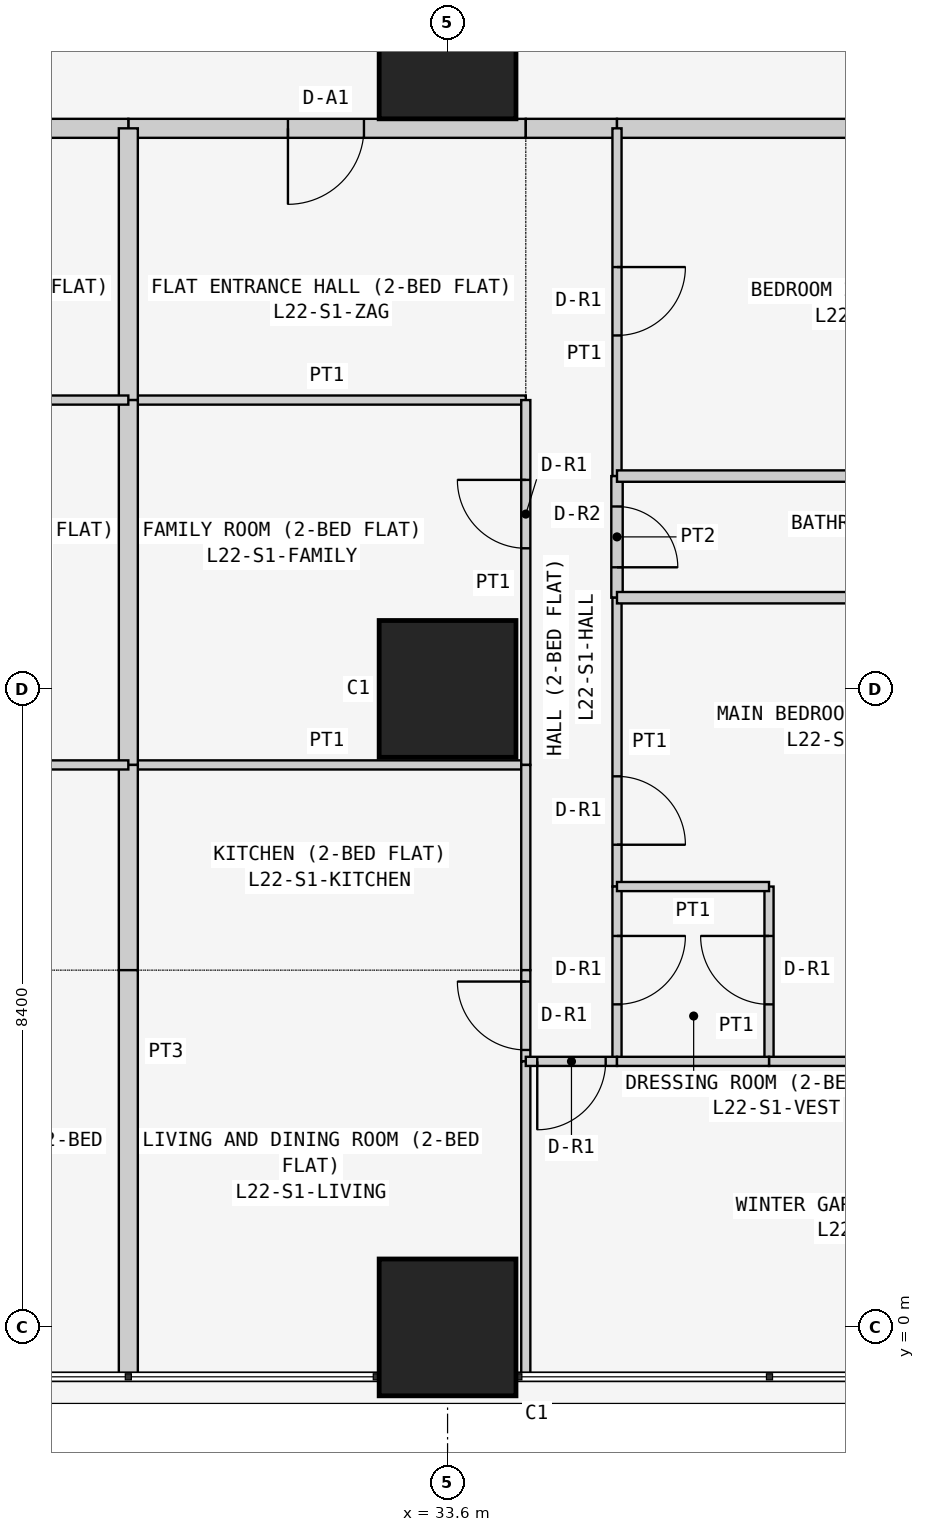
"""IFC4 building model, lengths in metres.
Left out: names, types, materials, properties, quantities, classifications, styles, units other than length and angle.
Written with IfcOpenShell. Run it as: python <this file> out.ifc"""

import sys

from ifc_helpers import new_model, si_unit, direction, frame, frame_2d, origin, origin_2d, place, context, subcontext, project, spatial, rectangle, extrude, element, fill, save


model = new_model("IFC4")
c1 = context("Model", 3, precision=1e-05, world=origin(), true_north=direction((0.0, 1.0)))
c2 = subcontext(c1, "Body", "Model", "MODEL_VIEW")
j1 = project(units=[si_unit("LENGTHUNIT", "METRE"), si_unit("PLANEANGLEUNIT", "RADIAN")], contexts=[c1])
p1 = place(None, origin())
s1 = spatial("IfcSite", under=j1, at=p1, CompositionType="ELEMENT")
p2 = place(p1, origin())
s2 = spatial("IfcBuilding", under=s1, at=p2, CompositionType="ELEMENT")
p3 = place(p2, frame((0.0, 0.0, 88.5)))
s3 = spatial("IfcBuildingStorey", under=s2, at=p3, CompositionType="ELEMENT", Elevation=88.5)
for number, where, z_axis, x_axis in (
    (1, (33.6, 0.0, 0.0), (0.0, 0.0, 1.0), (1.0, 0.0, 0.0)),
    (2, (33.6, 8.4, 0.0), (0.0, 0.0, 1.0), (1.0, 0.0, 0.0)),
    (3, (33.6, 16.8, 0.0), (0.0, 0.0, 1.0), (1.0, 0.0, 0.0)),
):
    element("IfcColumn", number, at=place(p3, frame(where, z_axis=z_axis, x_axis=x_axis)), inside=s3, PredefinedType="COLUMN", context=c2, shape_type="SweptSolid", body=[
        extrude(rectangle(XDim=1.8, YDim=1.8, at=origin_2d()), origin(), (0.0, 0.0, 1.0), 3.6),
    ])
p4 = place(p3, frame((34.629, 15.775, 0.0), z_axis=(0.0, 0.0, 1.0), x_axis=(-1.0, 0.0, 0.0)))
e4 = element("IfcWall", 4, at=p4, inside=s3, PredefinedType="PARTITIONING", context=c2, shape_type="SweptSolid", body=[
    extrude(rectangle(XDim=5.229, YDim=0.25, at=frame_2d((2.615, 0.0))), origin(), (0.0, 0.0, 1.0), 3.45),
])
p5 = place(p4, frame((2.129, 0.0, 0.0)))
e5 = element("IfcOpeningElement", 5, at=p5, cuts=e4, PredefinedType="OPENING", context=c2, shape_type="SweptSolid", body=[
    extrude(rectangle(XDim=1.0, YDim=2.1, at=frame_2d((0.5, 1.05))), frame((0.0, 0.135, 0.0), z_axis=(0.0, -1.0, 0.0), x_axis=(1.0, 0.0, 0.0)), (0.0, 0.0, 1.0), 0.27),
])
p6 = place(p3, frame((35.829, 15.775, 0.0), z_axis=(0.0, 0.0, 1.0), x_axis=(-1.0, 0.0, 0.0)))
e6 = element("IfcWall", 6, at=p6, inside=s3, PredefinedType="PARTITIONING", context=c2, shape_type="SweptSolid", body=[
    extrude(rectangle(XDim=1.2, YDim=0.25, at=frame_2d((0.6, 0.0))), origin(), (0.0, 0.0, 1.0), 3.45),
])
p7 = place(p3, frame((42.7, 15.775, 0.0), z_axis=(0.0, 0.0, 1.0), x_axis=(-1.0, 0.0, 0.0)))
e7 = element("IfcWall", 7, at=p7, inside=s3, PredefinedType="PARTITIONING", context=c2, shape_type="SweptSolid", body=[
    extrude(rectangle(XDim=6.871, YDim=0.25, at=frame_2d((3.436, 0.0))), origin(), (0.0, 0.0, 1.0), 3.45),
])
p8 = place(p3, frame((29.4, 15.775, 0.0), z_axis=(0.0, 0.0, 1.0), x_axis=(-1.0, 0.0, 0.0)))
e8 = element("IfcWall", 8, at=p8, inside=s3, PredefinedType="PARTITIONING", context=c2, shape_type="SweptSolid", body=[
    extrude(rectangle(XDim=5.229, YDim=0.25, at=frame_2d((2.615, 0.0))), origin(), (0.0, 0.0, 1.0), 3.45),
])
p9 = place(p8, frame((2.1, 0.0, 0.0)))
e9 = element("IfcOpeningElement", 9, at=p9, cuts=e8, PredefinedType="OPENING", context=c2, shape_type="SweptSolid", body=[
    extrude(rectangle(XDim=1.0, YDim=2.1, at=frame_2d((0.5, 1.05))), frame((0.0, 0.135, 0.0), z_axis=(0.0, -1.0, 0.0), x_axis=(1.0, 0.0, 0.0)), (0.0, 0.0, 1.0), 0.27),
])
p10 = place(p3, frame((29.4, 12.2, 0.0), z_axis=(0.0, 0.0, 1.0), x_axis=(1.0, 0.0, 0.0)))
e10 = element("IfcWall", 10, at=p10, inside=s3, PredefinedType="PARTITIONING", context=c2, shape_type="SweptSolid", body=[
    extrude(rectangle(XDim=5.229, YDim=0.12, at=frame_2d((2.615, 0.0))), origin(), (0.0, 0.0, 1.0), 3.45),
])
p11 = place(p3, frame((29.4, 15.775, 0.0), z_axis=(0.0, 0.0, 1.0), x_axis=(0.0, -1.0, 0.0)))
e11 = element("IfcWall", 11, at=p11, inside=s3, PredefinedType="PARTITIONING", context=c2, shape_type="SweptSolid", body=[
    extrude(rectangle(XDim=3.575, YDim=0.25, at=frame_2d((1.788, 0.0))), origin(), (0.0, 0.0, 1.0), 2.848),
])
p12 = place(p3, frame((29.4, 7.4, 0.0), z_axis=(0.0, 0.0, 1.0), x_axis=(1.0, 0.0, 0.0)))
e12 = element("IfcWall", 12, at=p12, inside=s3, PredefinedType="PARTITIONING", context=c2, shape_type="SweptSolid", body=[
    extrude(rectangle(XDim=5.229, YDim=0.12, at=frame_2d((2.615, 0.0))), origin(), (0.0, 0.0, 1.0), 3.45),
])
p13 = place(p3, frame((34.629, 7.4, 0.0), z_axis=(0.0, 0.0, 1.0), x_axis=(0.0, 1.0, 0.0)))
e13 = element("IfcWall", 13, at=p13, inside=s3, PredefinedType="PARTITIONING", context=c2, shape_type="SweptSolid", body=[
    extrude(rectangle(XDim=4.8, YDim=0.12, at=frame_2d((2.4, 0.0))), origin(), (0.0, 0.0, 1.0), 3.45),
])
p14 = place(p13, frame((2.85, 0.0, 0.0)))
e14 = element("IfcOpeningElement", 14, at=p14, cuts=e13, PredefinedType="OPENING", context=c2, shape_type="SweptSolid", body=[
    extrude(rectangle(XDim=0.9, YDim=2.1, at=frame_2d((0.45, 1.05))), frame((0.0, 0.07, 0.0), z_axis=(0.0, -1.0, 0.0), x_axis=(1.0, 0.0, 0.0)), (0.0, 0.0, 1.0), 0.14),
])
p15 = place(p3, frame((29.4, 12.2, 0.0), z_axis=(0.0, 0.0, 1.0), x_axis=(0.0, -1.0, 0.0)))
e15 = element("IfcWall", 15, at=p15, inside=s3, PredefinedType="PARTITIONING", context=c2, shape_type="SweptSolid", body=[
    extrude(rectangle(XDim=4.8, YDim=0.25, at=frame_2d((2.4, 0.0))), origin(), (0.0, 0.0, 1.0), 2.848),
])
p16 = place(p3, frame((34.629, 4.7, 0.0), z_axis=(0.0, 0.0, 1.0), x_axis=(0.0, 1.0, 0.0)))
e16 = element("IfcWall", 16, at=p16, inside=s3, PredefinedType="PARTITIONING", context=c2, shape_type="SweptSolid", body=[
    extrude(rectangle(XDim=2.7, YDim=0.12, at=frame_2d((1.35, 0.0))), origin(), (0.0, 0.0, 1.0), 3.45),
])
p17 = place(p3, frame((29.4, 7.4, 0.0), z_axis=(0.0, 0.0, 1.0), x_axis=(0.0, -1.0, 0.0)))
e17 = element("IfcWall", 17, at=p17, inside=s3, PredefinedType="PARTITIONING", context=c2, shape_type="SweptSolid", body=[
    extrude(rectangle(XDim=2.7, YDim=0.25, at=frame_2d((1.35, 0.0))), origin(), (0.0, 0.0, 1.0), 2.848),
])
p18 = place(p3, frame((34.629, 3.5, 0.0), z_axis=(0.0, 0.0, 1.0), x_axis=(0.0, 1.0, 0.0)))
e18 = element("IfcWall", 18, at=p18, inside=s3, PredefinedType="PARTITIONING", context=c2, shape_type="SweptSolid", body=[
    extrude(rectangle(XDim=1.2, YDim=0.12, at=frame_2d((0.6, 0.0))), origin(), (0.0, 0.0, 1.0), 3.45),
])
p19 = place(p18, frame((0.15, 0.0, 0.0)))
e19 = element("IfcOpeningElement", 19, at=p19, cuts=e18, PredefinedType="OPENING", context=c2, shape_type="SweptSolid", body=[
    extrude(rectangle(XDim=0.9, YDim=2.1, at=frame_2d((0.45, 1.05))), frame((0.0, 0.07, 0.0), z_axis=(0.0, -1.0, 0.0), x_axis=(1.0, 0.0, 0.0)), (0.0, 0.0, 1.0), 0.14),
])
p20 = place(p3, frame((34.629, -0.65, 0.0), z_axis=(0.0, 0.0, 1.0), x_axis=(0.0, 1.0, 0.0)))
e20 = element("IfcWall", 20, at=p20, inside=s3, PredefinedType="PARTITIONING", context=c2, shape_type="SweptSolid", body=[
    extrude(rectangle(XDim=4.15, YDim=0.12, at=frame_2d((2.075, 0.0))), origin(), (0.0, 0.0, 1.0), 3.45),
])
p21 = place(p3, frame((29.4, 4.7, 0.0), z_axis=(0.0, 0.0, 1.0), x_axis=(0.0, -1.0, 0.0)))
e21 = element("IfcWall", 21, at=p21, inside=s3, PredefinedType="PARTITIONING", context=c2, shape_type="SweptSolid", body=[
    extrude(rectangle(XDim=5.35, YDim=0.25, at=frame_2d((2.675, 0.0))), origin(), (0.0, 0.0, 1.0), 2.848),
])
p22 = place(p3, frame((35.829, 11.2, 0.0), z_axis=(0.0, 0.0, 1.0), x_axis=(0.0, 1.0, 0.0)))
e22 = element("IfcWall", 22, at=p22, inside=s3, PredefinedType="PARTITIONING", context=c2, shape_type="SweptSolid", body=[
    extrude(rectangle(XDim=4.575, YDim=0.12, at=frame_2d((2.288, 0.0))), origin(), (0.0, 0.0, 1.0), 3.45),
])
p23 = place(p22, frame((1.85, 0.0, 0.0)))
e23 = element("IfcOpeningElement", 23, at=p23, cuts=e22, PredefinedType="OPENING", context=c2, shape_type="SweptSolid", body=[
    extrude(rectangle(XDim=0.9, YDim=2.1, at=frame_2d((0.45, 1.05))), frame((0.0, 0.07, 0.0), z_axis=(0.0, -1.0, 0.0), x_axis=(1.0, 0.0, 0.0)), (0.0, 0.0, 1.0), 0.14),
])
p24 = place(p3, frame((35.829, 9.6, 0.0), z_axis=(0.0, 0.0, 1.0), x_axis=(0.0, 1.0, 0.0)))
e24 = element("IfcWall", 24, at=p24, inside=s3, PredefinedType="PARTITIONING", context=c2, shape_type="SweptSolid", body=[
    extrude(rectangle(XDim=1.6, YDim=0.15, at=frame_2d((0.8, 0.0))), origin(), (0.0, 0.0, 1.0), 3.45),
])
p25 = place(p24, frame((0.4, 0.0, 0.0)))
e25 = element("IfcOpeningElement", 25, at=p25, cuts=e24, PredefinedType="OPENING", context=c2, shape_type="SweptSolid", body=[
    extrude(rectangle(XDim=0.8, YDim=2.1, at=frame_2d((0.4, 1.05))), frame((0.0, 0.085, 0.0), z_axis=(0.0, -1.0, 0.0), x_axis=(1.0, 0.0, 0.0)), (0.0, 0.0, 1.0), 0.17),
])
p26 = place(p3, frame((35.829, 5.8, 0.0), z_axis=(0.0, 0.0, 1.0), x_axis=(0.0, 1.0, 0.0)))
e26 = element("IfcWall", 26, at=p26, inside=s3, PredefinedType="PARTITIONING", context=c2, shape_type="SweptSolid", body=[
    extrude(rectangle(XDim=3.8, YDim=0.12, at=frame_2d((1.9, 0.0))), origin(), (0.0, 0.0, 1.0), 3.45),
])
p27 = place(p26, frame((0.55, 0.0, 0.0)))
e27 = element("IfcOpeningElement", 27, at=p27, cuts=e26, PredefinedType="OPENING", context=c2, shape_type="SweptSolid", body=[
    extrude(rectangle(XDim=0.9, YDim=2.1, at=frame_2d((0.45, 1.05))), frame((0.0, 0.07, 0.0), z_axis=(0.0, -1.0, 0.0), x_axis=(1.0, 0.0, 0.0)), (0.0, 0.0, 1.0), 0.14),
])
p28 = place(p3, frame((35.829, 3.5, 0.0), z_axis=(0.0, 0.0, 1.0), x_axis=(0.0, 1.0, 0.0)))
e28 = element("IfcWall", 28, at=p28, inside=s3, PredefinedType="PARTITIONING", context=c2, shape_type="SweptSolid", body=[
    extrude(rectangle(XDim=2.3, YDim=0.12, at=frame_2d((1.15, 0.0))), origin(), (0.0, 0.0, 1.0), 3.45),
])
p29 = place(p28, frame((0.75, 0.0, 0.0)))
e29 = element("IfcOpeningElement", 29, at=p29, cuts=e28, PredefinedType="OPENING", context=c2, shape_type="SweptSolid", body=[
    extrude(rectangle(XDim=0.9, YDim=2.1, at=frame_2d((0.45, 1.05))), frame((0.0, 0.07, 0.0), z_axis=(0.0, -1.0, 0.0), x_axis=(1.0, 0.0, 0.0)), (0.0, 0.0, 1.0), 0.14),
])
p30 = place(p3, frame((34.629, 3.5, 0.0), z_axis=(0.0, 0.0, 1.0), x_axis=(1.0, 0.0, 0.0)))
e30 = element("IfcWall", 30, at=p30, inside=s3, PredefinedType="PARTITIONING", context=c2, shape_type="SweptSolid", body=[
    extrude(rectangle(XDim=1.2, YDim=0.12, at=frame_2d((0.6, 0.0))), origin(), (0.0, 0.0, 1.0), 3.45),
])
p31 = place(p30, frame((0.151, 0.0, 0.0)))
e31 = element("IfcOpeningElement", 31, at=p31, cuts=e30, PredefinedType="OPENING", context=c2, shape_type="SweptSolid", body=[
    extrude(rectangle(XDim=0.9, YDim=2.1, at=frame_2d((0.45, 1.05))), frame((0.0, 0.07, 0.0), z_axis=(0.0, -1.0, 0.0), x_axis=(1.0, 0.0, 0.0)), (0.0, 0.0, 1.0), 0.14),
])
for number, where, z_axis, x_axis in (
    (32, (35.829, 11.2, 0.0), (0.0, 0.0, 1.0), (1.0, 0.0, 0.0)),
    (33, (35.829, 9.6, 0.0), (0.0, 0.0, 1.0), (1.0, 0.0, 0.0)),
):
    element("IfcWall", number, at=place(p3, frame(where, z_axis=z_axis, x_axis=x_axis)), inside=s3, PredefinedType="PARTITIONING", context=c2, shape_type="SweptSolid", body=[
        extrude(rectangle(XDim=6.871, YDim=0.15, at=frame_2d((3.436, 0.0))), origin(), (0.0, 0.0, 1.0), 3.45),
    ])
p32 = place(p3, frame((37.829, 3.5, 0.0), z_axis=(0.0, 0.0, 1.0), x_axis=(0.0, 1.0, 0.0)))
e34 = element("IfcWall", 34, at=p32, inside=s3, PredefinedType="PARTITIONING", context=c2, shape_type="SweptSolid", body=[
    extrude(rectangle(XDim=2.3, YDim=0.12, at=frame_2d((1.15, 0.0))), origin(), (0.0, 0.0, 1.0), 2.848),
])
p33 = place(p32, frame((0.75, 0.0, 0.0)))
e35 = element("IfcOpeningElement", 35, at=p33, cuts=e34, PredefinedType="OPENING", context=c2, shape_type="SweptSolid", body=[
    extrude(rectangle(XDim=0.9, YDim=2.1, at=frame_2d((0.45, 1.05))), frame((0.0, 0.07, 0.0), z_axis=(0.0, -1.0, 0.0), x_axis=(1.0, 0.0, 0.0)), (0.0, 0.0, 1.0), 0.14),
])
p34 = place(p3, frame((37.829, 5.8, 0.0), z_axis=(0.0, 0.0, 1.0), x_axis=(-1.0, 0.0, 0.0)))
e36 = element("IfcWall", 36, at=p34, inside=s3, PredefinedType="PARTITIONING", context=c2, shape_type="SweptSolid", body=[
    extrude(rectangle(XDim=2.0, YDim=0.12, at=frame_2d((1.0, 0.0))), origin(), (0.0, 0.0, 1.0), 3.45),
])
p35 = place(p3, frame((42.7, 3.5, 0.0), z_axis=(0.0, 0.0, 1.0), x_axis=(-1.0, 0.0, 0.0)))
e37 = element("IfcWall", 37, at=p35, inside=s3, PredefinedType="PARTITIONING", context=c2, shape_type="SweptSolid", body=[
    extrude(rectangle(XDim=4.871, YDim=0.12, at=frame_2d((2.436, 0.0))), origin(), (0.0, 0.0, 1.0), 3.45),
])
p36 = place(p3, frame((35.829, 3.5, 0.0), z_axis=(0.0, 0.0, 1.0), x_axis=(1.0, 0.0, 0.0)))
e38 = element("IfcWall", 38, at=p36, inside=s3, PredefinedType="PARTITIONING", context=c2, shape_type="SweptSolid", body=[
    extrude(rectangle(XDim=2.0, YDim=0.12, at=frame_2d((1.0, 0.0))), origin(), (0.0, 0.0, 1.0), 3.45),
])
for number, where, z_axis, x_axis in (
    (39, (29.4, 12.2, 0.0), (0.0, 0.0, 1.0), (-1.0, 0.0, 0.0)),
    (40, (29.4, 7.4, 0.0), (0.0, 0.0, 1.0), (-1.0, 0.0, 0.0)),
):
    element("IfcWall", number, at=place(p3, frame(where, z_axis=z_axis, x_axis=x_axis)), inside=s3, PredefinedType="PARTITIONING", context=c2, shape_type="SweptSolid", body=[
        extrude(rectangle(XDim=5.229, YDim=0.12, at=frame_2d((2.615, 0.0))), origin(), (0.0, 0.0, 1.0), 3.45),
    ])
p37 = place(p5, origin())
e41 = element("IfcDoor", 41, at=p37, inside=s3, OperationType="SINGLE_SWING_RIGHT", PredefinedType="DOOR", context=c2, shape_type="SweptSolid", body=[
    extrude(rectangle(XDim=1.0, YDim=2.1, at=frame_2d((0.5, 1.05))), frame((0.0, 0.025, 0.0), z_axis=(0.0, -1.0, 0.0), x_axis=(1.0, 0.0, 0.0)), (0.0, 0.0, 1.0), 0.05),
])
fill(e5, e41)
p38 = place(p14, origin())
e42 = element("IfcDoor", 42, at=p38, inside=s3, OperationType="SINGLE_SWING_RIGHT", PredefinedType="DOOR", context=c2, shape_type="SweptSolid", body=[
    extrude(rectangle(XDim=0.9, YDim=2.1, at=frame_2d((0.45, 1.05))), frame((0.0, 0.025, 0.0), z_axis=(0.0, -1.0, 0.0), x_axis=(1.0, 0.0, 0.0)), (0.0, 0.0, 1.0), 0.05),
])
fill(e14, e42)
p39 = place(p19, origin())
e43 = element("IfcDoor", 43, at=p39, inside=s3, OperationType="SINGLE_SWING_RIGHT", PredefinedType="DOOR", context=c2, shape_type="SweptSolid", body=[
    extrude(rectangle(XDim=0.9, YDim=2.1, at=frame_2d((0.45, 1.05))), frame((0.0, 0.025, 0.0), z_axis=(0.0, -1.0, 0.0), x_axis=(1.0, 0.0, 0.0)), (0.0, 0.0, 1.0), 0.05),
])
fill(e19, e43)
p40 = place(p23, frame((0.9, 0.0, 0.0), z_axis=(0.0, 0.0, 1.0), x_axis=(-1.0, 0.0, 0.0)))
e44 = element("IfcDoor", 44, at=p40, inside=s3, OperationType="SINGLE_SWING_LEFT", PredefinedType="DOOR", context=c2, shape_type="SweptSolid", body=[
    extrude(rectangle(XDim=0.9, YDim=2.1, at=frame_2d((0.45, 1.05))), frame((0.0, 0.025, 0.0), z_axis=(0.0, -1.0, 0.0), x_axis=(1.0, 0.0, 0.0)), (0.0, 0.0, 1.0), 0.05),
])
fill(e23, e44)
p41 = place(p25, frame((0.8, 0.0, 0.0), z_axis=(0.0, 0.0, 1.0), x_axis=(-1.0, 0.0, 0.0)))
e45 = element("IfcDoor", 45, at=p41, inside=s3, OperationType="SINGLE_SWING_RIGHT", PredefinedType="DOOR", context=c2, shape_type="SweptSolid", body=[
    extrude(rectangle(XDim=0.8, YDim=2.1, at=frame_2d((0.4, 1.05))), frame((0.0, 0.025, 0.0), z_axis=(0.0, -1.0, 0.0), x_axis=(1.0, 0.0, 0.0)), (0.0, 0.0, 1.0), 0.05),
])
fill(e25, e45)
p42 = place(p27, frame((0.9, 0.0, 0.0), z_axis=(0.0, 0.0, 1.0), x_axis=(-1.0, 0.0, 0.0)))
e46 = element("IfcDoor", 46, at=p42, inside=s3, OperationType="SINGLE_SWING_RIGHT", PredefinedType="DOOR", context=c2, shape_type="SweptSolid", body=[
    extrude(rectangle(XDim=0.9, YDim=2.1, at=frame_2d((0.45, 1.05))), frame((0.0, 0.025, 0.0), z_axis=(0.0, -1.0, 0.0), x_axis=(1.0, 0.0, 0.0)), (0.0, 0.0, 1.0), 0.05),
])
fill(e27, e46)
p43 = place(p29, frame((0.9, 0.0, 0.0), z_axis=(0.0, 0.0, 1.0), x_axis=(-1.0, 0.0, 0.0)))
e47 = element("IfcDoor", 47, at=p43, inside=s3, OperationType="SINGLE_SWING_LEFT", PredefinedType="DOOR", context=c2, shape_type="SweptSolid", body=[
    extrude(rectangle(XDim=0.9, YDim=2.1, at=frame_2d((0.45, 1.05))), frame((0.0, 0.025, 0.0), z_axis=(0.0, -1.0, 0.0), x_axis=(1.0, 0.0, 0.0)), (0.0, 0.0, 1.0), 0.05),
])
fill(e29, e47)
p44 = place(p33, origin())
e48 = element("IfcDoor", 48, at=p44, inside=s3, OperationType="SINGLE_SWING_RIGHT", PredefinedType="DOOR", context=c2, shape_type="SweptSolid", body=[
    extrude(rectangle(XDim=0.9, YDim=2.1, at=frame_2d((0.45, 1.05))), frame((0.0, 0.025, 0.0), z_axis=(0.0, -1.0, 0.0), x_axis=(1.0, 0.0, 0.0)), (0.0, 0.0, 1.0), 0.05),
])
fill(e35, e48)
p45 = place(p31, frame((0.9, 0.0, 0.0), z_axis=(0.0, 0.0, 1.0), x_axis=(-1.0, 0.0, 0.0)))
e49 = element("IfcDoor", 49, at=p45, inside=s3, OperationType="SINGLE_SWING_RIGHT", PredefinedType="DOOR", context=c2, shape_type="SweptSolid", body=[
    extrude(rectangle(XDim=0.9, YDim=2.1, at=frame_2d((0.45, 1.05))), frame((0.0, 0.025, 0.0), z_axis=(0.0, -1.0, 0.0), x_axis=(1.0, 0.0, 0.0)), (0.0, 0.0, 1.0), 0.05),
])
fill(e31, e49)
save(model, sys.argv[1])
